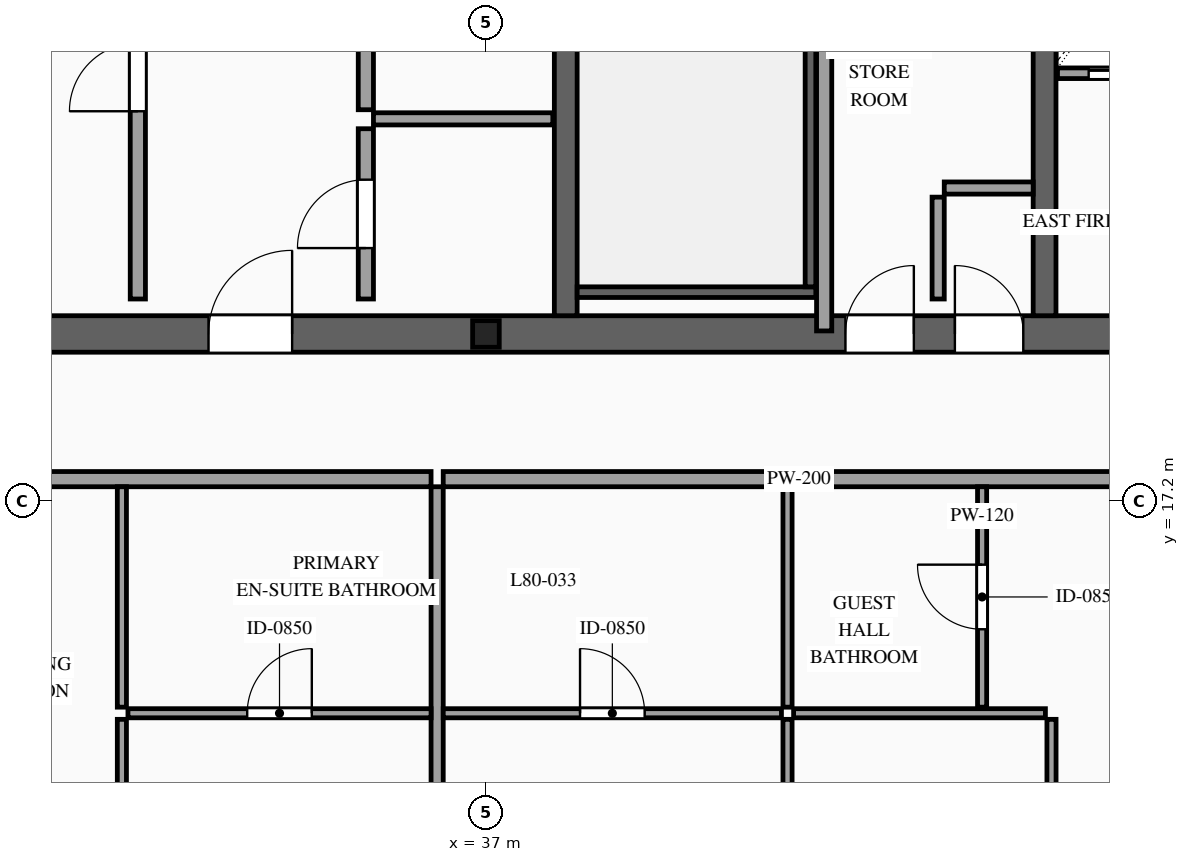
"""IFC4 building model, lengths in metres.
Left out: names, types, materials, properties, quantities, classifications, styles, units other than length and angle.
Written with IfcOpenShell. Run it as: python <this file> out.ifc"""

import sys

from ifc_helpers import new_model, si_unit, direction, frame, frame_2d, origin, origin_2d, place, context, subcontext, project, spatial, rectangle, i_section, extrude, source, transform, mapped, element, fill, save


model = new_model("IFC4")
c1 = context("Model", 3, precision=1e-05, world=origin(), true_north=direction((0.0, 1.0)))
c2 = subcontext(c1, "Body", "Model", "MODEL_VIEW")
j1 = project(units=[si_unit("LENGTHUNIT", "METRE"), si_unit("PLANEANGLEUNIT", "RADIAN")], contexts=[c1])
p1 = place(None, origin())
s1 = spatial("IfcSite", under=j1, at=p1, CompositionType="ELEMENT")
p2 = place(p1, origin())
s2 = spatial("IfcBuilding", under=s1, at=p2, CompositionType="ELEMENT")
p3 = place(p2, frame((0.0, 0.0, 299.6)))
s3 = spatial("IfcBuildingStorey", under=s2, at=p3, CompositionType="ELEMENT", Elevation=299.6)
p4 = place(p3, frame((23.56, 19.4, 0.0), z_axis=(0.0, 0.0, 1.0), x_axis=(1.0, 0.0, 0.0)))
e1 = element("IfcWall", 1, at=p4, inside=s3, PredefinedType="SHEAR", context=c2, shape_type="SweptSolid", body=[
    extrude(rectangle(XDim=26.88, YDim=0.48, at=frame_2d((13.44, 0.0))), origin(), (0.0, 0.0, 1.0), 3.5),
])
p5 = place(p4, frame((1.89, 0.0, 0.0)))
e2 = element("IfcOpeningElement", 2, at=p5, cuts=e1, PredefinedType="OPENING", context=c2, shape_type="SweptSolid", body=[
    extrude(rectangle(XDim=1.1, YDim=2.2, at=frame_2d((0.55, 1.1))), frame((0.0, 0.255, 0.0), z_axis=(0.0, -1.0, 0.0), x_axis=(1.0, 0.0, 0.0)), (0.0, 0.0, 1.0), 0.51),
])
p6 = place(p4, frame((9.79, 0.0, 0.0)))
e3 = element("IfcOpeningElement", 3, at=p6, cuts=e1, PredefinedType="OPENING", context=c2, shape_type="SweptSolid", body=[
    extrude(rectangle(XDim=1.1, YDim=2.2, at=frame_2d((0.55, 1.1))), frame((0.0, 0.255, 0.0), z_axis=(0.0, -1.0, 0.0), x_axis=(1.0, 0.0, 0.0)), (0.0, 0.0, 1.0), 0.51),
])
p7 = place(p4, frame((22.99, 0.0, 0.0)))
e4 = element("IfcOpeningElement", 4, at=p7, cuts=e1, PredefinedType="OPENING", context=c2, shape_type="SweptSolid", body=[
    extrude(rectangle(XDim=1.1, YDim=2.2, at=frame_2d((0.55, 1.1))), frame((0.0, 0.255, 0.0), z_axis=(0.0, -1.0, 0.0), x_axis=(1.0, 0.0, 0.0)), (0.0, 0.0, 1.0), 0.51),
])
p8 = place(p4, frame((19.61, 0.0, 0.0)))
e5 = element("IfcOpeningElement", 5, at=p8, cuts=e1, PredefinedType="OPENING", context=c2, shape_type="SweptSolid", body=[
    extrude(rectangle(XDim=0.9, YDim=2.15, at=frame_2d((0.45, 1.075))), frame((0.0, 0.255, 0.0), z_axis=(0.0, -1.0, 0.0), x_axis=(1.0, 0.0, 0.0)), (0.0, 0.0, 1.0), 0.51),
])
p9 = place(p4, frame((18.17, 0.0, 0.0)))
e6 = element("IfcOpeningElement", 6, at=p9, cuts=e1, PredefinedType="OPENING", context=c2, shape_type="SweptSolid", body=[
    extrude(rectangle(XDim=0.9, YDim=2.15, at=frame_2d((0.45, 1.075))), frame((0.0, 0.255, 0.0), z_axis=(0.0, -1.0, 0.0), x_axis=(1.0, 0.0, 0.0)), (0.0, 0.0, 1.0), 0.51),
])
m1 = source(origin(), c2, "Body", "SweptSolid", [
    extrude(rectangle(XDim=12.32, YDim=0.3, at=frame_2d((6.16, 0.0))), origin(), (0.0, 0.0, 1.0), 3.5),
])
p10 = place(p3, frame((38.05, 19.64, 0.0), z_axis=(0.0, 0.0, 1.0), x_axis=(0.0, 1.0, 0.0)))
e7 = element("IfcWall", 7, at=p10, inside=s3, PredefinedType="SOLIDWALL", context=c2, shape_type="MappedRepresentation", body=[
    mapped(m1, transform((0.0, 0.0, 0.0), scale=1.0)),
])
p11 = place(p3, frame((44.35, 19.64, 0.0), z_axis=(0.0, 0.0, 1.0), x_axis=(0.0, 1.0, 0.0)))
e8 = element("IfcWall", 8, at=p11, inside=s3, PredefinedType="SOLIDWALL", context=c2, shape_type="SweptSolid", body=[
    extrude(rectangle(XDim=12.32, YDim=0.3, at=frame_2d((6.16, 0.0))), origin(), (0.0, 0.0, 1.0), 3.5),
])
p12 = place(p11, frame((6.56, 0.0, 0.0)))
e9 = element("IfcOpeningElement", 9, at=p12, cuts=e8, PredefinedType="OPENING", context=c2, shape_type="SweptSolid", body=[
    extrude(rectangle(XDim=1.1, YDim=2.2, at=frame_2d((0.55, 1.1))), frame((0.0, 0.165, 0.0), z_axis=(0.0, -1.0, 0.0), x_axis=(1.0, 0.0, 0.0)), (0.0, 0.0, 1.0), 0.33),
])
p13 = place(p11, frame((8.66, 0.0, 0.0)))
e10 = element("IfcOpeningElement", 10, at=p13, cuts=e8, PredefinedType="OPENING", context=c2, shape_type="SweptSolid", body=[
    extrude(rectangle(XDim=1.1, YDim=2.2, at=frame_2d((0.55, 1.1))), frame((0.0, 0.165, 0.0), z_axis=(0.0, -1.0, 0.0), x_axis=(1.0, 0.0, 0.0)), (0.0, 0.0, 1.0), 0.33),
])
p14 = place(p11, frame((10.76, 0.0, 0.0)))
e11 = element("IfcOpeningElement", 11, at=p14, cuts=e8, PredefinedType="OPENING", context=c2, shape_type="SweptSolid", body=[
    extrude(rectangle(XDim=1.1, YDim=2.2, at=frame_2d((0.55, 1.1))), frame((0.0, 0.165, 0.0), z_axis=(0.0, -1.0, 0.0), x_axis=(1.0, 0.0, 0.0)), (0.0, 0.0, 1.0), 0.33),
])
m2 = source(origin(), c2, "Body", "SweptSolid", [
    extrude(i_section(OverallWidth=0.35, OverallDepth=0.35, WebThickness=0.012, FlangeThickness=0.019, at=origin_2d()), origin(), (0.0, 0.0, 1.0), 3.5),
])
p15 = place(p3, frame((37.0, 19.4, 0.0), z_axis=(0.0, 0.0, 1.0), x_axis=(1.0, 0.0, 0.0)))
e12 = element("IfcColumn", 12, at=p15, inside=s3, PredefinedType="COLUMN", context=c2, shape_type="MappedRepresentation", body=[
    mapped(m2, transform((0.0, 0.0, 0.0), scale=1.0)),
])
p16 = place(p3, frame((44.52, 22.83, 0.0), z_axis=(0.0, 0.0, 1.0), x_axis=(1.0, 0.0, 0.0)))
e13 = element("IfcWall", 13, at=p16, inside=s3, PredefinedType="SOLIDWALL", context=c2, shape_type="SweptSolid", body=[
    extrude(rectangle(XDim=1.92, YDim=0.14, at=frame_2d((0.96, 0.0))), origin(), (0.0, 0.0, 1.0), 3.28),
])
p17 = place(p16, frame((0.41, 0.0, 0.0)))
e14 = element("IfcOpeningElement", 14, at=p17, cuts=e13, PredefinedType="OPENING", context=c2, shape_type="SweptSolid", body=[
    extrude(rectangle(XDim=1.1, YDim=2.2, at=frame_2d((0.55, 1.1))), frame((0.0, 0.085, 0.0), z_axis=(0.0, -1.0, 0.0), x_axis=(1.0, 0.0, 0.0)), (0.0, 0.0, 1.0), 0.17),
])
m3 = source(origin(), c2, "Body", "SweptSolid", [
    extrude(rectangle(XDim=3.14, YDim=0.14, at=frame_2d((1.57, 0.0))), origin(), (0.0, 0.0, 1.0), 3.28),
])
p18 = place(p3, frame((38.2, 19.95, 0.0), z_axis=(0.0, 0.0, 1.0), x_axis=(1.0, 0.0, 0.0)))
e15 = element("IfcWall", 15, at=p18, inside=s3, PredefinedType="SOLIDWALL", context=c2, shape_type="MappedRepresentation", body=[
    mapped(m3, transform((0.0, 0.0, 0.0), scale=1.0)),
])
m4 = source(origin(), c2, "Body", "SweptSolid", [
    extrude(rectangle(XDim=8.94, YDim=0.14, at=frame_2d((4.47, 0.0))), origin(), (0.0, 0.0, 1.0), 3.28),
])
p19 = place(p3, frame((41.27, 20.02, 0.0), z_axis=(0.0, 0.0, 1.0), x_axis=(0.0, 1.0, 0.0)))
e16 = element("IfcWall", 16, at=p19, inside=s3, PredefinedType="SOLIDWALL", context=c2, shape_type="MappedRepresentation", body=[
    mapped(m4, transform((0.0, 0.0, 0.0), scale=1.0)),
])
p20 = place(p3, frame((32.42, 19.86, 0.0), z_axis=(0.0, 0.0, 1.0), x_axis=(0.0, 1.0, 0.0)))
e17 = element("IfcWall", 17, at=p20, inside=s3, PredefinedType="PARTITIONING", context=c2, shape_type="SweptSolid", body=[
    extrude(rectangle(XDim=5.84, YDim=0.2, at=frame_2d((2.92, 0.0))), origin(), (0.0, 0.0, 1.0), 3.28),
])
p21 = place(p20, frame((2.47, 0.0, 0.0)))
e18 = element("IfcOpeningElement", 18, at=p21, cuts=e17, PredefinedType="OPENING", context=c2, shape_type="SweptSolid", body=[
    extrude(rectangle(XDim=0.9, YDim=2.15, at=frame_2d((0.45, 1.075))), frame((0.0, 0.115, 0.0), z_axis=(0.0, -1.0, 0.0), x_axis=(1.0, 0.0, 0.0)), (0.0, 0.0, 1.0), 0.23),
])
p22 = place(p3, frame((35.42, 19.86, 0.0), z_axis=(0.0, 0.0, 1.0), x_axis=(0.0, 1.0, 0.0)))
e19 = element("IfcWall", 19, at=p22, inside=s3, PredefinedType="PARTITIONING", context=c2, shape_type="SweptSolid", body=[
    extrude(rectangle(XDim=2.24, YDim=0.2, at=frame_2d((1.12, 0.0))), origin(), (0.0, 0.0, 1.0), 3.28),
])
p23 = place(p22, frame((0.67, 0.0, 0.0)))
e20 = element("IfcOpeningElement", 20, at=p23, cuts=e19, PredefinedType="OPENING", context=c2, shape_type="SweptSolid", body=[
    extrude(rectangle(XDim=0.9, YDim=2.15, at=frame_2d((0.45, 1.075))), frame((0.0, 0.115, 0.0), z_axis=(0.0, -1.0, 0.0), x_axis=(1.0, 0.0, 0.0)), (0.0, 0.0, 1.0), 0.23),
])
p24 = place(p3, frame((35.42, 22.35, 0.0), z_axis=(0.0, 0.0, 1.0), x_axis=(0.0, 1.0, 0.0)))
e21 = element("IfcWall", 21, at=p24, inside=s3, PredefinedType="PARTITIONING", context=c2, shape_type="SweptSolid", body=[
    extrude(rectangle(XDim=6.73, YDim=0.2, at=frame_2d((3.365, 0.0))), origin(), (0.0, 0.0, 1.0), 3.28),
])
p25 = place(p24, frame((2.915, 0.0, 0.0)))
e22 = element("IfcOpeningElement", 22, at=p25, cuts=e21, PredefinedType="OPENING", context=c2, shape_type="SweptSolid", body=[
    extrude(rectangle(XDim=0.9, YDim=2.15, at=frame_2d((0.45, 1.075))), frame((0.0, 0.115, 0.0), z_axis=(0.0, -1.0, 0.0), x_axis=(1.0, 0.0, 0.0)), (0.0, 0.0, 1.0), 0.23),
])
m5 = source(origin(), c2, "Body", "SweptSolid", [
    extrude(rectangle(XDim=2.36, YDim=0.16, at=frame_2d((1.18, 0.0))), origin(), (0.0, 0.0, 1.0), 3.28),
])
p26 = place(p3, frame((35.52, 22.23, 0.0), z_axis=(0.0, 0.0, 1.0), x_axis=(1.0, 0.0, 0.0)))
e23 = element("IfcWall", 23, at=p26, inside=s3, PredefinedType="PARTITIONING", context=c2, shape_type="MappedRepresentation", body=[
    mapped(m5, transform((0.0, 0.0, 0.0), scale=1.0)),
])
m6 = source(origin(), c2, "Body", "SweptSolid", [
    extrude(rectangle(XDim=1.34, YDim=0.16, at=frame_2d((0.67, 0.0))), origin(), (0.0, 0.0, 1.0), 3.28),
])
p27 = place(p3, frame((42.95, 19.86, 0.0), z_axis=(0.0, 0.0, 1.0), x_axis=(0.0, 1.0, 0.0)))
e24 = element("IfcWall", 24, at=p27, inside=s3, PredefinedType="PARTITIONING", context=c2, shape_type="MappedRepresentation", body=[
    mapped(m6, transform((0.0, 0.0, 0.0), scale=1.0)),
])
m7 = source(origin(), c2, "Body", "SweptSolid", [
    extrude(rectangle(XDim=1.17, YDim=0.16, at=frame_2d((0.585, 0.0))), origin(), (0.0, 0.0, 1.0), 3.28),
])
p28 = place(p3, frame((43.03, 21.32, 0.0), z_axis=(0.0, 0.0, 1.0), x_axis=(1.0, 0.0, 0.0)))
e25 = element("IfcWall", 25, at=p28, inside=s3, PredefinedType="PARTITIONING", context=c2, shape_type="MappedRepresentation", body=[
    mapped(m7, transform((0.0, 0.0, 0.0), scale=1.0)),
])
m8 = source(origin(), c2, "Body", "SweptSolid", [
    extrude(rectangle(XDim=6.06, YDim=0.2, at=frame_2d((3.03, 0.0))), origin(), (0.0, 0.0, 1.0), 3.28),
])
p29 = place(p3, frame((41.45, 19.44, 0.0), z_axis=(0.0, 0.0, 1.0), x_axis=(0.0, 1.0, 0.0)))
e26 = element("IfcWall", 26, at=p29, inside=s3, PredefinedType="PARTITIONING", context=c2, shape_type="MappedRepresentation", body=[
    mapped(m8, transform((0.0, 0.0, 0.0), scale=1.0)),
])
p30 = place(p3, frame((20.94, 17.49, 0.0), z_axis=(0.0, 0.0, 1.0), x_axis=(1.0, 0.0, 0.0)))
e27 = element("IfcWall", 27, at=p30, inside=s3, PredefinedType="PARTITIONING", context=c2, shape_type="SweptSolid", body=[
    extrude(rectangle(XDim=15.338, YDim=0.2, at=frame_2d((7.669, 0.0))), origin(), (0.0, 0.0, 1.0), 3.28),
])
p31 = place(p30, frame((8.927, 0.0, 0.0)))
e28 = element("IfcOpeningElement", 28, at=p31, cuts=e27, PredefinedType="OPENING", context=c2, shape_type="SweptSolid", body=[
    extrude(rectangle(XDim=1.0, YDim=2.2, at=frame_2d((0.5, 1.1))), frame((0.0, 0.115, 0.0), z_axis=(0.0, -1.0, 0.0), x_axis=(1.0, 0.0, 0.0)), (0.0, 0.0, 1.0), 0.23),
])
m9 = source(origin(), c2, "Body", "SweptSolid", [
    extrude(rectangle(XDim=10.54, YDim=0.16, at=frame_2d((5.27, 0.0))), origin(), (0.0, 0.0, 1.0), 3.28),
])
p32 = place(p3, frame((36.358, 6.85, 0.0), z_axis=(0.0, 0.0, 1.0), x_axis=(0.0, 1.0, 0.0)))
e29 = element("IfcWall", 29, at=p32, inside=s3, PredefinedType="PARTITIONING", context=c2, shape_type="MappedRepresentation", body=[
    mapped(m9, transform((0.0, 0.0, 0.0), scale=1.0)),
])
p33 = place(p3, frame((32.29, 14.41, 0.0), z_axis=(0.0, 0.0, 1.0), x_axis=(1.0, 0.0, 0.0)))
e30 = element("IfcWall", 30, at=p33, inside=s3, PredefinedType="PARTITIONING", context=c2, shape_type="SweptSolid", body=[
    extrude(rectangle(XDim=3.988, YDim=0.12, at=frame_2d((1.994, 0.0))), origin(), (0.0, 0.0, 1.0), 3.28),
])
p34 = place(p33, frame((1.569, 0.0, 0.0)))
e31 = element("IfcOpeningElement", 31, at=p34, cuts=e30, PredefinedType="OPENING", context=c2, shape_type="SweptSolid", body=[
    extrude(rectangle(XDim=0.85, YDim=2.1, at=frame_2d((0.425, 1.05))), frame((0.0, 0.075, 0.0), z_axis=(0.0, -1.0, 0.0), x_axis=(1.0, 0.0, 0.0)), (0.0, 0.0, 1.0), 0.15),
])
m10 = source(origin(), c2, "Body", "SweptSolid", [
    extrude(rectangle(XDim=2.9, YDim=0.12, at=frame_2d((1.45, 0.0))), origin(), (0.0, 0.0, 1.0), 3.28),
])
p35 = place(p3, frame((32.21, 14.49, 0.0), z_axis=(0.0, 0.0, 1.0), x_axis=(0.0, 1.0, 0.0)))
e32 = element("IfcWall", 32, at=p35, inside=s3, PredefinedType="PARTITIONING", context=c2, shape_type="MappedRepresentation", body=[
    mapped(m10, transform((0.0, 0.0, 0.0), scale=1.0)),
])
p36 = place(p3, frame((32.21, 6.85, 0.0), z_axis=(0.0, 0.0, 1.0), x_axis=(0.0, 1.0, 0.0)))
e33 = element("IfcWall", 33, at=p36, inside=s3, PredefinedType="PARTITIONING", context=c2, shape_type="SweptSolid", body=[
    extrude(rectangle(XDim=7.48, YDim=0.12, at=frame_2d((3.74, 0.0))), origin(), (0.0, 0.0, 1.0), 3.28),
])
p37 = place(p36, frame((3.29, 0.0, 0.0)))
e34 = element("IfcOpeningElement", 34, at=p37, cuts=e33, PredefinedType="OPENING", context=c2, shape_type="SweptSolid", body=[
    extrude(rectangle(XDim=0.9, YDim=2.15, at=frame_2d((0.45, 1.075))), frame((0.0, 0.075, 0.0), z_axis=(0.0, -1.0, 0.0), x_axis=(1.0, 0.0, 0.0)), (0.0, 0.0, 1.0), 0.15),
])
p38 = place(p3, frame((36.438, 17.49, 0.0), z_axis=(0.0, 0.0, 1.0), x_axis=(1.0, 0.0, 0.0)))
e35 = element("IfcWall", 35, at=p38, inside=s3, PredefinedType="PARTITIONING", context=c2, shape_type="SweptSolid", body=[
    extrude(rectangle(XDim=16.622, YDim=0.2, at=frame_2d((8.311, 0.0))), origin(), (0.0, 0.0, 1.0), 3.28),
])
p39 = place(p38, frame((9.611, 0.0, 0.0)))
e36 = element("IfcOpeningElement", 36, at=p39, cuts=e35, PredefinedType="OPENING", context=c2, shape_type="SweptSolid", body=[
    extrude(rectangle(XDim=1.0, YDim=2.2, at=frame_2d((0.5, 1.1))), frame((0.0, 0.115, 0.0), z_axis=(0.0, -1.0, 0.0), x_axis=(1.0, 0.0, 0.0)), (0.0, 0.0, 1.0), 0.23),
])
p40 = place(p3, frame((36.438, 14.41, 0.0), z_axis=(0.0, 0.0, 1.0), x_axis=(1.0, 0.0, 0.0)))
e37 = element("IfcWall", 37, at=p40, inside=s3, PredefinedType="PARTITIONING", context=c2, shape_type="SweptSolid", body=[
    extrude(rectangle(XDim=4.45, YDim=0.12, at=frame_2d((2.225, 0.0))), origin(), (0.0, 0.0, 1.0), 3.28),
])
p41 = place(p40, frame((1.8, 0.0, 0.0)))
e38 = element("IfcOpeningElement", 38, at=p41, cuts=e37, PredefinedType="OPENING", context=c2, shape_type="SweptSolid", body=[
    extrude(rectangle(XDim=0.85, YDim=2.1, at=frame_2d((0.425, 1.05))), frame((0.0, 0.075, 0.0), z_axis=(0.0, -1.0, 0.0), x_axis=(1.0, 0.0, 0.0)), (0.0, 0.0, 1.0), 0.15),
])
p42 = place(p3, frame((40.968, 14.49, 0.0), z_axis=(0.0, 0.0, 1.0), x_axis=(0.0, 1.0, 0.0)))
e39 = element("IfcWall", 39, at=p42, inside=s3, PredefinedType="PARTITIONING", context=c2, shape_type="MappedRepresentation", body=[
    mapped(m10, transform((0.0, 0.0, 0.0), scale=1.0)),
])
p43 = place(p3, frame((43.528, 14.49, 0.0), z_axis=(0.0, 0.0, 1.0), x_axis=(0.0, 1.0, 0.0)))
e40 = element("IfcWall", 40, at=p43, inside=s3, PredefinedType="PARTITIONING", context=c2, shape_type="SweptSolid", body=[
    extrude(rectangle(XDim=2.9, YDim=0.12, at=frame_2d((1.45, 0.0))), origin(), (0.0, 0.0, 1.0), 3.28),
])
p44 = place(p43, frame((1.025, 0.0, 0.0)))
e41 = element("IfcOpeningElement", 41, at=p44, cuts=e40, PredefinedType="OPENING", context=c2, shape_type="SweptSolid", body=[
    extrude(rectangle(XDim=0.85, YDim=2.1, at=frame_2d((0.425, 1.05))), frame((0.0, 0.075, 0.0), z_axis=(0.0, -1.0, 0.0), x_axis=(1.0, 0.0, 0.0)), (0.0, 0.0, 1.0), 0.15),
])
p45 = place(p3, frame((40.968, 6.85, 0.0), z_axis=(0.0, 0.0, 1.0), x_axis=(0.0, 1.0, 0.0)))
e42 = element("IfcWall", 42, at=p45, inside=s3, PredefinedType="PARTITIONING", context=c2, shape_type="SweptSolid", body=[
    extrude(rectangle(XDim=7.48, YDim=0.12, at=frame_2d((3.74, 0.0))), origin(), (0.0, 0.0, 1.0), 3.28),
])
p46 = place(p45, frame((3.29, 0.0, 0.0)))
e43 = element("IfcOpeningElement", 43, at=p46, cuts=e42, PredefinedType="OPENING", context=c2, shape_type="SweptSolid", body=[
    extrude(rectangle(XDim=0.9, YDim=2.15, at=frame_2d((0.45, 1.075))), frame((0.0, 0.075, 0.0), z_axis=(0.0, -1.0, 0.0), x_axis=(1.0, 0.0, 0.0)), (0.0, 0.0, 1.0), 0.15),
])
m11 = source(origin(), c2, "Body", "SweptSolid", [
    extrude(rectangle(XDim=3.313, YDim=0.12, at=frame_2d((1.656, 0.0))), origin(), (0.0, 0.0, 1.0), 3.28),
])
p47 = place(p3, frame((41.048, 14.41, 0.0), z_axis=(0.0, 0.0, 1.0), x_axis=(1.0, 0.0, 0.0)))
e44 = element("IfcWall", 44, at=p47, inside=s3, PredefinedType="PARTITIONING", context=c2, shape_type="MappedRepresentation", body=[
    mapped(m11, transform((0.0, 0.0, 0.0), scale=1.0)),
])
p48 = place(p3, frame((44.441, 6.85, 0.0), z_axis=(0.0, 0.0, 1.0), x_axis=(0.0, 1.0, 0.0)))
e45 = element("IfcWall", 45, at=p48, inside=s3, PredefinedType="PARTITIONING", context=c2, shape_type="SweptSolid", body=[
    extrude(rectangle(XDim=7.48, YDim=0.12, at=frame_2d((3.74, 0.0))), origin(), (0.0, 0.0, 1.0), 3.28),
])
p49 = place(p48, frame((3.29, 0.0, 0.0)))
e46 = element("IfcOpeningElement", 46, at=p49, cuts=e45, PredefinedType="OPENING", context=c2, shape_type="SweptSolid", body=[
    extrude(rectangle(XDim=0.9, YDim=2.15, at=frame_2d((0.45, 1.075))), frame((0.0, 0.075, 0.0), z_axis=(0.0, -1.0, 0.0), x_axis=(1.0, 0.0, 0.0)), (0.0, 0.0, 1.0), 0.15),
])
m12 = source(origin(), c2, "Body", "SweptSolid", [
    extrude(rectangle(XDim=1.1, YDim=2.2, at=frame_2d((0.55, 1.1))), frame((0.0, 0.025, 0.0), z_axis=(0.0, -1.0, 0.0), x_axis=(1.0, 0.0, 0.0)), (0.0, 0.0, 1.0), 0.05),
])
p50 = place(p17, origin())
e47 = element("IfcDoor", 47, at=p50, inside=s3, OperationType="SLIDING_TO_RIGHT", PredefinedType="DOOR", context=c2, shape_type="MappedRepresentation", body=[
    mapped(m12, transform((0.0, 0.0, 0.0), scale=1.0)),
])
fill(e14, e47)
m13 = source(origin(), c2, "Body", "SweptSolid", [
    extrude(rectangle(XDim=1.1, YDim=2.2, at=frame_2d((0.55, 1.1))), frame((0.0, 0.025, 0.0), z_axis=(0.0, -1.0, 0.0), x_axis=(1.0, 0.0, 0.0)), (0.0, 0.0, 1.0), 0.05),
])
p51 = place(p6, origin())
e48 = element("IfcDoor", 48, at=p51, inside=s3, OperationType="SINGLE_SWING_RIGHT", PredefinedType="DOOR", context=c2, shape_type="MappedRepresentation", body=[
    mapped(m13, transform((0.0, 0.0, 0.0), scale=1.0)),
])
fill(e3, e48)
m14 = source(origin(), c2, "Body", "SweptSolid", [
    extrude(rectangle(XDim=0.9, YDim=2.15, at=frame_2d((0.45, 1.075))), frame((0.0, 0.025, 0.0), z_axis=(0.0, -1.0, 0.0), x_axis=(1.0, 0.0, 0.0)), (0.0, 0.0, 1.0), 0.05),
])
p52 = place(p21, origin())
e49 = element("IfcDoor", 49, at=p52, inside=s3, OperationType="SINGLE_SWING_LEFT", PredefinedType="DOOR", context=c2, shape_type="MappedRepresentation", body=[
    mapped(m14, transform((0.0, 0.0, 0.0), scale=1.0)),
])
fill(e18, e49)
p53 = place(p23, origin())
e50 = element("IfcDoor", 50, at=p53, inside=s3, OperationType="SINGLE_SWING_LEFT", PredefinedType="DOOR", context=c2, shape_type="MappedRepresentation", body=[
    mapped(m14, transform((0.0, 0.0, 0.0), scale=1.0)),
])
fill(e20, e50)
p54 = place(p8, origin())
e51 = element("IfcDoor", 51, at=p54, inside=s3, OperationType="SINGLE_SWING_LEFT", PredefinedType="DOOR", context=c2, shape_type="MappedRepresentation", body=[
    mapped(m14, transform((0.0, 0.0, 0.0), scale=1.0)),
])
fill(e5, e51)
p55 = place(p9, origin())
e52 = element("IfcDoor", 52, at=p55, inside=s3, OperationType="SINGLE_SWING_RIGHT", PredefinedType="DOOR", context=c2, shape_type="MappedRepresentation", body=[
    mapped(m14, transform((0.0, 0.0, 0.0), scale=1.0)),
])
fill(e6, e52)
m15 = source(origin(), c2, "Body", "SweptSolid", [
    extrude(rectangle(XDim=0.85, YDim=2.1, at=frame_2d((0.425, 1.05))), frame((0.0, 0.025, 0.0), z_axis=(0.0, -1.0, 0.0), x_axis=(1.0, 0.0, 0.0)), (0.0, 0.0, 1.0), 0.05),
])
p56 = place(p34, origin())
e53 = element("IfcDoor", 53, at=p56, inside=s3, OperationType="SINGLE_SWING_RIGHT", PredefinedType="DOOR", context=c2, shape_type="MappedRepresentation", body=[
    mapped(m15, transform((0.0, 0.0, 0.0), scale=1.0)),
])
fill(e31, e53)
p57 = place(p41, origin())
e54 = element("IfcDoor", 54, at=p57, inside=s3, OperationType="SINGLE_SWING_LEFT", PredefinedType="DOOR", context=c2, shape_type="MappedRepresentation", body=[
    mapped(m15, transform((0.0, 0.0, 0.0), scale=1.0)),
])
fill(e38, e54)
p58 = place(p44, origin())
e55 = element("IfcDoor", 55, at=p58, inside=s3, OperationType="SINGLE_SWING_RIGHT", PredefinedType="DOOR", context=c2, shape_type="MappedRepresentation", body=[
    mapped(m15, transform((0.0, 0.0, 0.0), scale=1.0)),
])
fill(e41, e55)
save(model, sys.argv[1])
